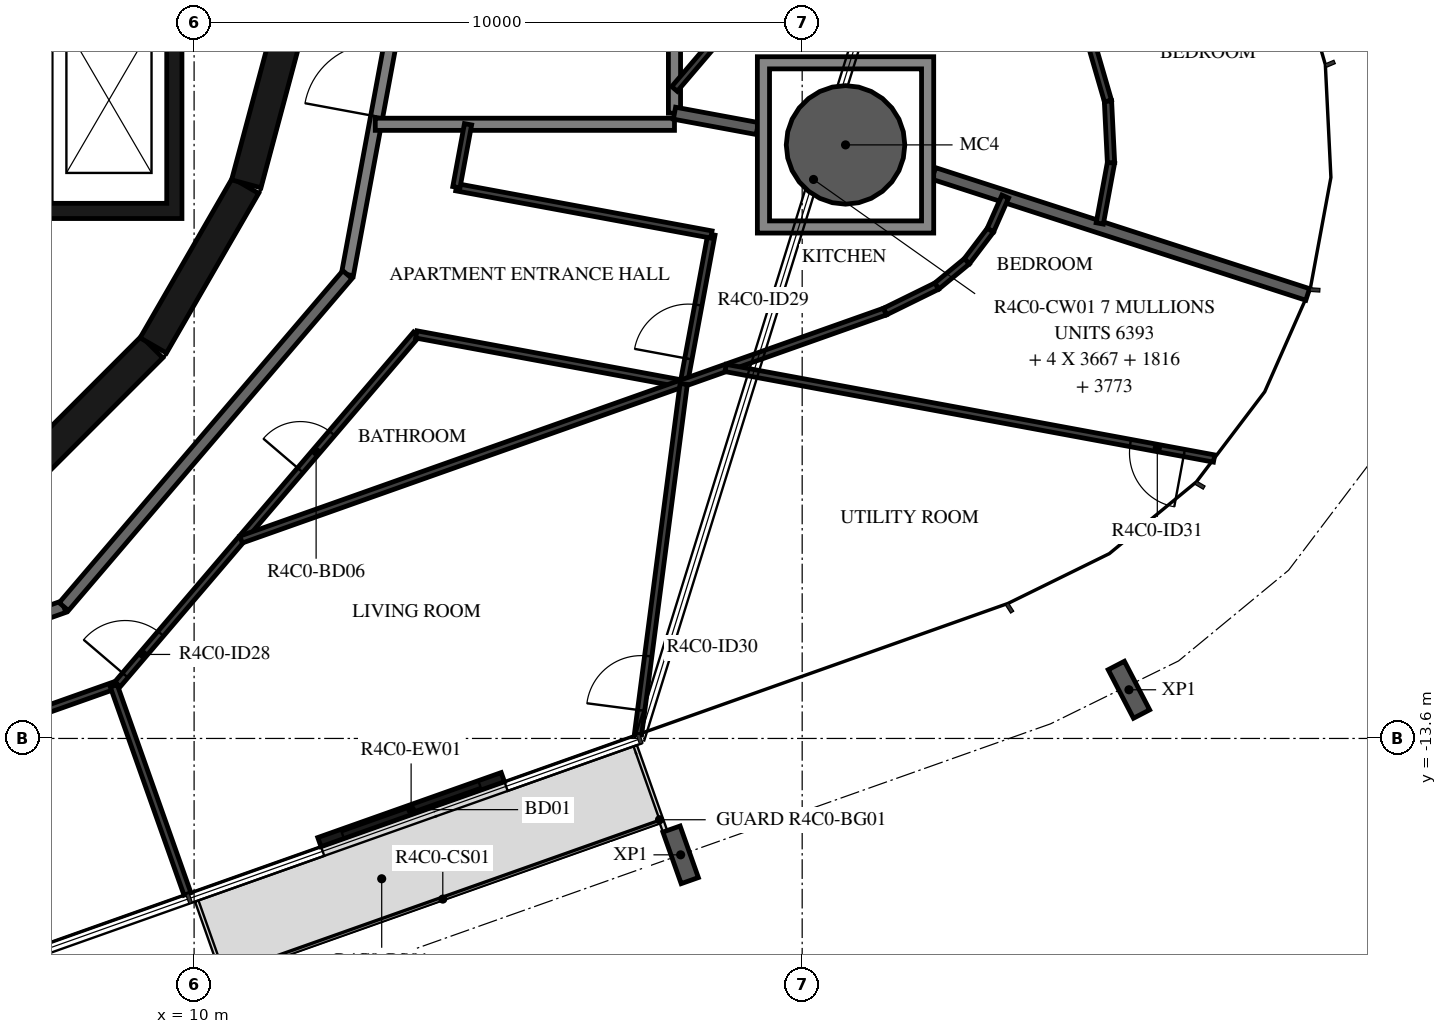
"""IFC4 building model, lengths in metres.
Left out: names, types, materials, properties, quantities, classifications, styles, units other than length and angle.
Written with IfcOpenShell. Run it as: python <this file> out.ifc"""

import sys

from ifc_helpers import new_model, si_unit, direction, frame, frame_2d, origin, origin_2d, place, context, subcontext, project, spatial, polyline, rectangle, hollow_circle, i_section, outline, extrude, element, fill, save


model = new_model("IFC4")
c1 = context("Model", 3, precision=1e-05, world=origin(), true_north=direction((0.0, 1.0)))
c2 = subcontext(c1, "Body", "Model", "MODEL_VIEW")
j1 = project(units=[si_unit("LENGTHUNIT", "METRE"), si_unit("PLANEANGLEUNIT", "RADIAN")], contexts=[c1])
p1 = place(None, origin())
s1 = spatial("IfcSite", under=j1, at=p1, CompositionType="ELEMENT")
p2 = place(p1, origin())
s2 = spatial("IfcBuilding", under=s1, at=p2, CompositionType="ELEMENT")
p3 = place(p2, frame((0.0, 0.0, 179.7)))
s3 = spatial("IfcBuildingStorey", under=s2, at=p3, CompositionType="ELEMENT", Elevation=179.7)
p4 = place(p3, frame((20.713, -3.839, -0.38), z_axis=(0.0, 0.0, 1.0), x_axis=(1.0, 0.0, 0.0)))
e1 = element("IfcColumn", 1, at=p4, inside=s3, PredefinedType="COLUMN", context=c2, shape_type="SweptSolid", body=[
    extrude(hollow_circle(Radius=0.975, WallThickness=0.045, at=origin_2d()), origin(), (0.0, 0.0, 1.0), 2.616),
])
for number, where, z_axis, x_axis in (
    (2, (18.001, -15.514, -0.38), (0.0, 0.0, 1.0), (-0.943, -0.334, 0.0)),
    (3, (25.374, -12.799, -0.38), (0.0, 0.0, 1.0), (-0.887, -0.461, 0.0)),
):
    element("IfcColumn", number, at=place(p3, frame(where, z_axis=z_axis, x_axis=x_axis)), inside=s3, PredefinedType="COLUMN", context=c2, shape_type="SweptSolid", body=[
        extrude(i_section(OverallWidth=0.3, OverallDepth=0.9, WebThickness=0.019, FlangeThickness=0.035, FilletRadius=0.03, at=origin_2d()), origin(), (0.0, 0.0, 1.0), 2.616),
    ])
p5 = place(p3, frame((12.061, -15.305, 0.0), z_axis=(0.0, 0.0, 1.0), x_axis=(0.942620722428, 0.333865502335, 0.0)))
e4 = element("IfcWall", 4, at=p5, inside=s3, PredefinedType="STANDARD", context=c2, shape_type="SweptSolid", body=[
    extrude(rectangle(XDim=3.2, YDim=0.16, at=frame_2d((1.6, 0.0))), origin(), (0.0, 0.0, 1.0), 3.05),
])
p6 = place(p5, frame((0.4, 0.0, 0.0)))
e5 = element("IfcOpeningElement", 5, at=p6, cuts=e4, PredefinedType="OPENING", context=c2, shape_type="SweptSolid", body=[
    extrude(rectangle(XDim=2.4, YDim=2.4, at=frame_2d((1.2, 1.2))), frame((0.0, 0.09, 0.0), z_axis=(0.0, -1.0, 0.0), x_axis=(1.0, 0.0, 0.0)), (0.0, 0.0, 1.0), 0.18),
])
p7 = place(p3, frame((7.164, -9.308, 0.0), z_axis=(0.0, 0.0, 1.0), x_axis=(0.707106781187, 0.707106781187, 0.0)))
e6 = element("IfcWall", 6, at=p7, inside=s3, PredefinedType="SHEAR", context=c2, shape_type="SweptSolid", body=[
    extrude(rectangle(XDim=3.032, YDim=0.5, at=frame_2d((1.516, 0.0))), origin(), (0.0, 0.0, 1.0), 3.05),
])
for number, where, z_axis, x_axis in (
    (7, (9.329, -7.137, 0.0), (0.0, 0.0, 1.0), (0.5, 0.866, 0.0)),
    (8, (10.858, -4.479, 0.0), (0.0, 0.0, 1.0), (0.259, 0.966, 0.0)),
):
    element("IfcWall", number, at=place(p3, frame(where, z_axis=z_axis, x_axis=x_axis)), inside=s3, PredefinedType="SHEAR", context=c2, shape_type="SweptSolid", body=[
        extrude(rectangle(XDim=3.033, YDim=0.5, at=frame_2d((1.516, 0.0))), origin(), (0.0, 0.0, 1.0), 3.05),
    ])
p8 = place(p3, origin())
e9 = element("IfcWall", 9, at=p8, inside=s3, PredefinedType="SHEAR", context=c2, shape_type="SweptSolid", body=[
    extrude(outline(polyline([(9.8, -5.05), (9.8, -4.8), (9.8, -1.9), (9.55, -1.9), (9.55, -4.8), (7.65, -4.8), (7.65, -1.9), (7.4, -1.9), (7.4, -4.8), (5.5, -4.8), (5.5, -1.9), (5.25, -1.9), (5.25, -4.8), (3.35, -4.8), (3.35, -1.9), (3.1, -1.9), (3.1, -4.8), (1.2, -4.8), (1.2, -1.9), (0.95, -1.9), (0.95, -4.8), (-5.25, -4.8), (-5.25, -1.9), (-5.5, -1.9), (-5.5, -4.8), (-7.4, -4.8), (-7.4, -1.9), (-7.65, -1.9), (-7.65, -4.8), (-9.55, -4.8), (-9.55, -1.9), (-9.8, -1.9), (-9.8, -4.8), (-9.8, -5.05), (9.8, -5.05)])), origin(), (0.0, 0.0, 1.0), 3.05),
])
p9 = place(p3, frame((12.521, -5.972, 0.0), z_axis=(0.0, 0.0, 1.0), x_axis=(0.182244189886, 0.983253301674, 0.0)))
e10 = element("IfcWall", 10, at=p9, inside=s3, PredefinedType="STANDARD", context=c2, shape_type="SweptSolid", body=[
    extrude(rectangle(XDim=4.176, YDim=0.2, at=frame_2d((2.088, 0.0))), origin(), (0.0, 0.0, 1.0), 3.05),
])
p10 = place(p9, frame((2.645, 0.0, 0.0)))
e11 = element("IfcOpeningElement", 11, at=p10, cuts=e10, PredefinedType="OPENING", context=c2, shape_type="SweptSolid", body=[
    extrude(rectangle(XDim=1.2, YDim=2.0, at=frame_2d((0.6, 1.0))), frame((0.0, 0.11, 0.0), z_axis=(0.0, -1.0, 0.0), x_axis=(1.0, 0.0, 0.0)), (0.0, 0.0, 1.0), 0.22),
])
p11 = place(p3, frame((1.088, -13.83, 0.0), z_axis=(0.0, 0.0, 1.0), x_axis=(0.942648397945, 0.333787354241, 0.0)))
e12 = element("IfcWall", 12, at=p11, inside=s3, PredefinedType="STANDARD", context=c2, shape_type="SweptSolid", body=[
    extrude(rectangle(XDim=7.181, YDim=0.2, at=frame_2d((3.591, 0.0))), origin(), (0.0, 0.0, 1.0), 3.05),
])
p12 = place(p11, frame((0.2, 0.0, 0.0)))
e13 = element("IfcOpeningElement", 13, at=p12, cuts=e12, PredefinedType="OPENING", context=c2, shape_type="SweptSolid", body=[
    extrude(rectangle(XDim=1.0, YDim=2.1, at=frame_2d((0.5, 1.05))), frame((0.0, 0.11, 0.0), z_axis=(0.0, -1.0, 0.0), x_axis=(1.0, 0.0, 0.0)), (0.0, 0.0, 1.0), 0.22),
])
p13 = place(p3, frame((7.858, -11.433, 0.0), z_axis=(0.0, 0.0, 1.0), x_axis=(0.649440801937, 0.760412154545, 0.0)))
e14 = element("IfcWall", 14, at=p13, inside=s3, PredefinedType="STANDARD", context=c2, shape_type="SweptSolid", body=[
    extrude(rectangle(XDim=7.181, YDim=0.2, at=frame_2d((3.59, 0.0))), origin(), (0.0, 0.0, 1.0), 3.05),
])
p14 = place(p3, frame((17.9, -3.318, 0.0), z_axis=(0.0, 0.0, 1.0), x_axis=(0.0, 1.0, 0.0)))
e15 = element("IfcWall", 15, at=p14, inside=s3, PredefinedType="STANDARD", context=c2, shape_type="SweptSolid", body=[
    extrude(rectangle(XDim=6.818, YDim=0.2, at=frame_2d((3.409, 0.0))), origin(), (0.0, 0.0, 1.0), 3.05),
])
p15 = place(p3, frame((12.979, -3.5, 0.0), z_axis=(0.0, 0.0, 1.0), x_axis=(1.0, 0.0, 0.0)))
e16 = element("IfcWall", 16, at=p15, inside=s3, PredefinedType="STANDARD", context=c2, shape_type="SweptSolid", body=[
    extrude(rectangle(XDim=4.92, YDim=0.2, at=frame_2d((2.46, 0.0))), origin(), (0.0, 0.0, 1.0), 3.05),
])
p16 = place(p3, frame((22.163, -4.308, 0.0), z_axis=(0.0, 0.0, 1.0), x_axis=(0.951422718769, -0.307887658426, 0.0)))
e17 = element("IfcWall", 17, at=p16, inside=s3, PredefinedType="STANDARD", context=c2, shape_type="SweptSolid", body=[
    extrude(rectangle(XDim=6.464, YDim=0.2, at=frame_2d((3.232, 0.0))), origin(), (0.0, 0.0, 1.0), 3.05),
])
p17 = place(p3, frame((17.9, -3.318, 0.0), z_axis=(0.0, 0.0, 1.0), x_axis=(0.983252800712, -0.182246892682, 0.0)))
e18 = element("IfcWall", 18, at=p17, inside=s3, PredefinedType="STANDARD", context=c2, shape_type="SweptSolid", body=[
    extrude(rectangle(XDim=1.386, YDim=0.2, at=frame_2d((0.693, 0.0))), origin(), (0.0, 0.0, 1.0), 3.05),
])
p18 = place(p3, frame((17.9, -2.918, 0.0), z_axis=(0.0, 0.0, 1.0), x_axis=(0.649469887983, 0.760387312232, 0.0)))
e19 = element("IfcWall", 19, at=p18, inside=s3, PredefinedType="PARTITIONING", context=c2, shape_type="SweptSolid", body=[
    extrude(rectangle(XDim=5.527, YDim=0.12, at=frame_2d((2.763, 0.0))), origin(), (0.0, 0.0, 1.0), 3.05),
])
p19 = place(p18, frame((1.7, 0.0, 0.0)))
e20 = element("IfcOpeningElement", 20, at=p19, cuts=e19, PredefinedType="OPENING", context=c2, shape_type="SweptSolid", body=[
    extrude(rectangle(XDim=0.9, YDim=2.0, at=frame_2d((0.45, 1.0))), frame((0.0, 0.07, 0.0), z_axis=(0.0, -1.0, 0.0), x_axis=(1.0, 0.0, 0.0)), (0.0, 0.0, 1.0), 0.14),
])
for number, where, z_axis, x_axis in (
    (21, (24.894, -5.131, 0.0), (0.0, 0.0, 1.0), (0.182, 0.983, 0.0)),
    (22, (25.079, -4.132, 0.0), (0.0, 0.0, 1.0), (-0.049, 0.999, 0.0)),
):
    element("IfcWall", number, at=place(p3, frame(where, z_axis=z_axis, x_axis=x_axis)), inside=s3, PredefinedType="PARTITIONING", context=c2, shape_type="SweptSolid", body=[
        extrude(rectangle(XDim=1.016, YDim=0.12, at=frame_2d((0.508, 0.0))), origin(), (0.0, 0.0, 1.0), 3.05),
    ])
p20 = place(p3, frame((25.029, -3.117, 0.0), z_axis=(0.0, 0.0, 1.0), x_axis=(-0.278559922069, 0.96041885124, 0.0)))
e23 = element("IfcWall", 23, at=p20, inside=s3, PredefinedType="PARTITIONING", context=c2, shape_type="SweptSolid", body=[
    extrude(rectangle(XDim=1.016, YDim=0.12, at=frame_2d((0.508, 0.0))), origin(), (0.0, 0.0, 1.0), 3.05),
])
p21 = place(p3, frame((1.269, -15.357, 0.0), z_axis=(0.0, 0.0, 1.0), x_axis=(0.942639442898, 0.333812643101, 0.0)))
e24 = element("IfcWall", 24, at=p21, inside=s3, PredefinedType="PARTITIONING", context=c2, shape_type="SweptSolid", body=[
    extrude(rectangle(XDim=7.86, YDim=0.12, at=frame_2d((3.93, 0.0))), origin(), (0.0, 0.0, 1.0), 3.05),
])
p22 = place(p21, frame((0.2, 0.0, 0.0)))
e25 = element("IfcOpeningElement", 25, at=p22, cuts=e24, PredefinedType="OPENING", context=c2, shape_type="SweptSolid", body=[
    extrude(rectangle(XDim=0.9, YDim=2.1, at=frame_2d((0.45, 1.05))), frame((0.0, 0.07, 0.0), z_axis=(0.0, -1.0, 0.0), x_axis=(1.0, 0.0, 0.0)), (0.0, 0.0, 1.0), 0.14),
])
p23 = place(p3, frame((8.737, -12.713, 0.0), z_axis=(0.0, 0.0, 1.0), x_axis=(0.649427973074, 0.760423111031, 0.0)))
e26 = element("IfcWall", 26, at=p23, inside=s3, PredefinedType="PARTITIONING", context=c2, shape_type="SweptSolid", body=[
    extrude(rectangle(XDim=7.571, YDim=0.12, at=frame_2d((3.785, 0.0))), origin(), (0.0, 0.0, 1.0), 3.05),
])
p24 = place(p23, frame((0.2, 0.0, 0.0)))
e27 = element("IfcOpeningElement", 27, at=p24, cuts=e26, PredefinedType="OPENING", context=c2, shape_type="SweptSolid", body=[
    extrude(rectangle(XDim=0.9, YDim=2.1, at=frame_2d((0.45, 1.05))), frame((0.0, 0.07, 0.0), z_axis=(0.0, -1.0, 0.0), x_axis=(1.0, 0.0, 0.0)), (0.0, 0.0, 1.0), 0.14),
])
p25 = place(p23, frame((4.634, 0.0, 0.0)))
e28 = element("IfcOpeningElement", 28, at=p25, cuts=e26, PredefinedType="OPENING", context=c2, shape_type="SweptSolid", body=[
    extrude(rectangle(XDim=0.8, YDim=2.1, at=frame_2d((0.4, 1.05))), frame((0.0, 0.07, 0.0), z_axis=(0.0, -1.0, 0.0), x_axis=(1.0, 0.0, 0.0)), (0.0, 0.0, 1.0), 0.14),
])
p26 = place(p3, frame((13.654, -6.956, 0.0), z_axis=(0.0, 0.0, 1.0), x_axis=(0.983253166233, -0.18224492062, 0.0)))
e29 = element("IfcWall", 29, at=p26, inside=s3, PredefinedType="PARTITIONING", context=c2, shape_type="SweptSolid", body=[
    extrude(rectangle(XDim=4.437, YDim=0.12, at=frame_2d((2.218, 0.0))), origin(), (0.0, 0.0, 1.0), 3.05),
])
p27 = place(p3, frame((18.055, -7.75, 0.0), z_axis=(0.0, 0.0, 1.0), x_axis=(0.18225497314, 0.983251302957, 0.0)))
e30 = element("IfcWall", 30, at=p27, inside=s3, PredefinedType="PARTITIONING", context=c2, shape_type="SweptSolid", body=[
    extrude(rectangle(XDim=2.479, YDim=0.12, at=frame_2d((1.24, 0.0))), origin(), (0.0, 0.0, 1.0), 3.05),
])
p28 = place(p27, frame((0.4, 0.0, 0.0)))
e31 = element("IfcOpeningElement", 31, at=p28, cuts=e30, PredefinedType="OPENING", context=c2, shape_type="SweptSolid", body=[
    extrude(rectangle(XDim=0.9, YDim=2.1, at=frame_2d((0.45, 1.05))), frame((0.0, 0.07, 0.0), z_axis=(0.0, -1.0, 0.0), x_axis=(1.0, 0.0, 0.0)), (0.0, 0.0, 1.0), 0.14),
])
p29 = place(p3, frame((18.507, -5.312, 0.0), z_axis=(0.0, 0.0, 1.0), x_axis=(-0.983254286603, 0.182238875868, 0.0)))
e32 = element("IfcWall", 32, at=p29, inside=s3, PredefinedType="PARTITIONING", context=c2, shape_type="SweptSolid", body=[
    extrude(rectangle(XDim=4.266, YDim=0.12, at=frame_2d((2.133, 0.0))), origin(), (0.0, 0.0, 1.0), 3.05),
])
p30 = place(p3, frame((14.313, -4.535, 0.0), z_axis=(0.0, 0.0, 1.0), x_axis=(0.182271946033, 0.983248156718, 0.0)))
e33 = element("IfcWall", 33, at=p30, inside=s3, PredefinedType="PARTITIONING", context=c2, shape_type="SweptSolid", body=[
    extrude(rectangle(XDim=1.053, YDim=0.12, at=frame_2d((0.526, 0.0))), origin(), (0.0, 0.0, 1.0), 3.05),
])
p31 = place(p3, frame((9.891, -16.158, 0.0), z_axis=(0.0, 0.0, 1.0), x_axis=(-0.33385336213, 0.942625022262, 0.0)))
e34 = element("IfcWall", 34, at=p31, inside=s3, PredefinedType="PARTITIONING", context=c2, shape_type="SweptSolid", body=[
    extrude(rectangle(XDim=3.633, YDim=0.12, at=frame_2d((1.816, 0.0))), origin(), (0.0, 0.0, 1.0), 3.05),
])
p32 = place(p3, frame((21.362, -6.58, 0.0), z_axis=(0.0, 0.0, 1.0), x_axis=(-0.942647598157, -0.333789612913, 0.0)))
e35 = element("IfcWall", 35, at=p32, inside=s3, PredefinedType="PARTITIONING", context=c2, shape_type="SweptSolid", body=[
    extrude(rectangle(XDim=11.234, YDim=0.12, at=frame_2d((5.617, 0.0))), origin(), (0.0, 0.0, 1.0), 3.05),
])
p33 = place(p3, frame((17.3, -13.534, 0.0), z_axis=(0.0, 0.0, 1.0), x_axis=(0.129290698847, 0.99160673414, 0.0)))
e36 = element("IfcWall", 36, at=p33, inside=s3, PredefinedType="PARTITIONING", context=c2, shape_type="SweptSolid", body=[
    extrude(rectangle(XDim=5.812, YDim=0.12, at=frame_2d((2.906, 0.0))), origin(), (0.0, 0.0, 1.0), 3.05),
])
p34 = place(p33, frame((0.4, 0.0, 0.0)))
e37 = element("IfcOpeningElement", 37, at=p34, cuts=e36, PredefinedType="OPENING", context=c2, shape_type="SweptSolid", body=[
    extrude(rectangle(XDim=0.9, YDim=2.1, at=frame_2d((0.45, 1.05))), frame((0.0, 0.07, 0.0), z_axis=(0.0, -1.0, 0.0), x_axis=(1.0, 0.0, 0.0)), (0.0, 0.0, 1.0), 0.14),
])
p35 = place(p3, frame((26.774, -8.997, 0.0), z_axis=(0.0, 0.0, 1.0), x_axis=(-0.983258019748, 0.18221873285, 0.0)))
e38 = element("IfcWall", 38, at=p35, inside=s3, PredefinedType="PARTITIONING", context=c2, shape_type="SweptSolid", body=[
    extrude(rectangle(XDim=8.17, YDim=0.12, at=frame_2d((4.085, 0.0))), origin(), (0.0, 0.0, 1.0), 3.05),
])
p36 = place(p35, frame((0.5, 0.0, 0.0)))
e39 = element("IfcOpeningElement", 39, at=p36, cuts=e38, PredefinedType="OPENING", context=c2, shape_type="SweptSolid", body=[
    extrude(rectangle(XDim=0.9, YDim=2.1, at=frame_2d((0.45, 1.05))), frame((0.0, 0.07, 0.0), z_axis=(0.0, -1.0, 0.0), x_axis=(1.0, 0.0, 0.0)), (0.0, 0.0, 1.0), 0.14),
])
p37 = place(p3, frame((23.34, -4.689, 0.0), z_axis=(0.0, 0.0, 1.0), x_axis=(-0.404077449371, -0.914724775498, 0.0)))
e40 = element("IfcWall", 40, at=p37, inside=s3, PredefinedType="PARTITIONING", context=c2, shape_type="SweptSolid", body=[
    extrude(rectangle(XDim=0.605, YDim=0.12, at=frame_2d((0.302, 0.0))), origin(), (0.0, 0.0, 1.0), 3.05),
])
for number, where, z_axis, x_axis in (
    (41, (23.095, -5.242, 0.0), (0.0, 0.0, 1.0), (-0.604, -0.797, 0.0)),
    (42, (22.708, -5.754, 0.0), (0.0, 0.0, 1.0), (-0.772, -0.636, 0.0)),
):
    element("IfcWall", number, at=place(p3, frame(where, z_axis=z_axis, x_axis=x_axis)), inside=s3, PredefinedType="PARTITIONING", context=c2, shape_type="SweptSolid", body=[
        extrude(rectangle(XDim=0.642, YDim=0.12, at=frame_2d((0.321, 0.0))), origin(), (0.0, 0.0, 1.0), 3.05),
    ])
p38 = place(p3, frame((22.212, -6.162, 0.0), z_axis=(0.0, 0.0, 1.0), x_axis=(-0.897448694974, -0.441118850072, 0.0)))
e43 = element("IfcWall", 43, at=p38, inside=s3, PredefinedType="PARTITIONING", context=c2, shape_type="SweptSolid", body=[
    extrude(rectangle(XDim=0.947, YDim=0.12, at=frame_2d((0.474, 0.0))), origin(), (0.0, 0.0, 1.0), 3.05),
])
p39 = place(p3, origin())
e44 = element("IfcWall", 44, at=p39, inside=s3, PredefinedType="STANDARD", context=c2, shape_type="SweptSolid", body=[
    extrude(outline(polyline([(22.163, -2.389), (22.163, -5.289), (19.263, -5.289), (19.263, -2.389), (22.163, -2.389)]), holes=[polyline([(19.463, -5.089), (21.963, -5.089), (21.963, -2.589), (19.463, -2.589), (19.463, -5.089)])]), origin(), (0.0, 0.0, 1.0), 3.05),
])
p40 = place(p6, origin())
e45 = element("IfcDoor", 45, at=p40, inside=s3, OperationType="DOUBLE_DOOR_SLIDING", PredefinedType="DOOR", context=c2, shape_type="SweptSolid", body=[
    extrude(rectangle(XDim=2.4, YDim=2.4, at=frame_2d((1.2, 1.2))), frame((0.0, 0.025, 0.0), z_axis=(0.0, -1.0, 0.0), x_axis=(1.0, 0.0, 0.0)), (0.0, 0.0, 1.0), 0.05),
])
fill(e5, e45)
p41 = place(p24, origin())
e46 = element("IfcDoor", 46, at=p41, inside=s3, OperationType="SINGLE_SWING_RIGHT", PredefinedType="DOOR", context=c2, shape_type="SweptSolid", body=[
    extrude(rectangle(XDim=0.9, YDim=2.1, at=frame_2d((0.45, 1.05))), frame((0.0, 0.025, 0.0), z_axis=(0.0, -1.0, 0.0), x_axis=(1.0, 0.0, 0.0)), (0.0, 0.0, 1.0), 0.05),
])
fill(e27, e46)
p42 = place(p25, origin())
e47 = element("IfcDoor", 47, at=p42, inside=s3, OperationType="SINGLE_SWING_RIGHT", PredefinedType="DOOR", context=c2, shape_type="SweptSolid", body=[
    extrude(rectangle(XDim=0.8, YDim=2.1, at=frame_2d((0.4, 1.05))), frame((0.0, 0.025, 0.0), z_axis=(0.0, -1.0, 0.0), x_axis=(1.0, 0.0, 0.0)), (0.0, 0.0, 1.0), 0.05),
])
fill(e28, e47)
p43 = place(p28, origin())
e48 = element("IfcDoor", 48, at=p43, inside=s3, OperationType="SINGLE_SWING_RIGHT", PredefinedType="DOOR", context=c2, shape_type="SweptSolid", body=[
    extrude(rectangle(XDim=0.9, YDim=2.1, at=frame_2d((0.45, 1.05))), frame((0.0, 0.025, 0.0), z_axis=(0.0, -1.0, 0.0), x_axis=(1.0, 0.0, 0.0)), (0.0, 0.0, 1.0), 0.05),
])
fill(e31, e48)
p44 = place(p34, origin())
e49 = element("IfcDoor", 49, at=p44, inside=s3, OperationType="SINGLE_SWING_RIGHT", PredefinedType="DOOR", context=c2, shape_type="SweptSolid", body=[
    extrude(rectangle(XDim=0.9, YDim=2.1, at=frame_2d((0.45, 1.05))), frame((0.0, 0.025, 0.0), z_axis=(0.0, -1.0, 0.0), x_axis=(1.0, 0.0, 0.0)), (0.0, 0.0, 1.0), 0.05),
])
fill(e37, e49)
p45 = place(p36, origin())
e50 = element("IfcDoor", 50, at=p45, inside=s3, OperationType="SINGLE_SWING_RIGHT", PredefinedType="DOOR", context=c2, shape_type="SweptSolid", body=[
    extrude(rectangle(XDim=0.9, YDim=2.1, at=frame_2d((0.45, 1.05))), frame((0.0, 0.025, 0.0), z_axis=(0.0, -1.0, 0.0), x_axis=(1.0, 0.0, 0.0)), (0.0, 0.0, 1.0), 0.05),
])
fill(e39, e50)
p46 = place(p10, origin())
e51 = element("IfcDoor", 51, at=p46, inside=s3, OperationType="DOUBLE_DOOR_SINGLE_SWING", PredefinedType="DOOR", context=c2, shape_type="SweptSolid", body=[
    extrude(rectangle(XDim=1.2, YDim=2.0, at=frame_2d((0.6, 1.0))), frame((0.0, 0.025, 0.0), z_axis=(0.0, -1.0, 0.0), x_axis=(1.0, 0.0, 0.0)), (0.0, 0.0, 1.0), 0.05),
])
fill(e11, e51)
save(model, sys.argv[1])
